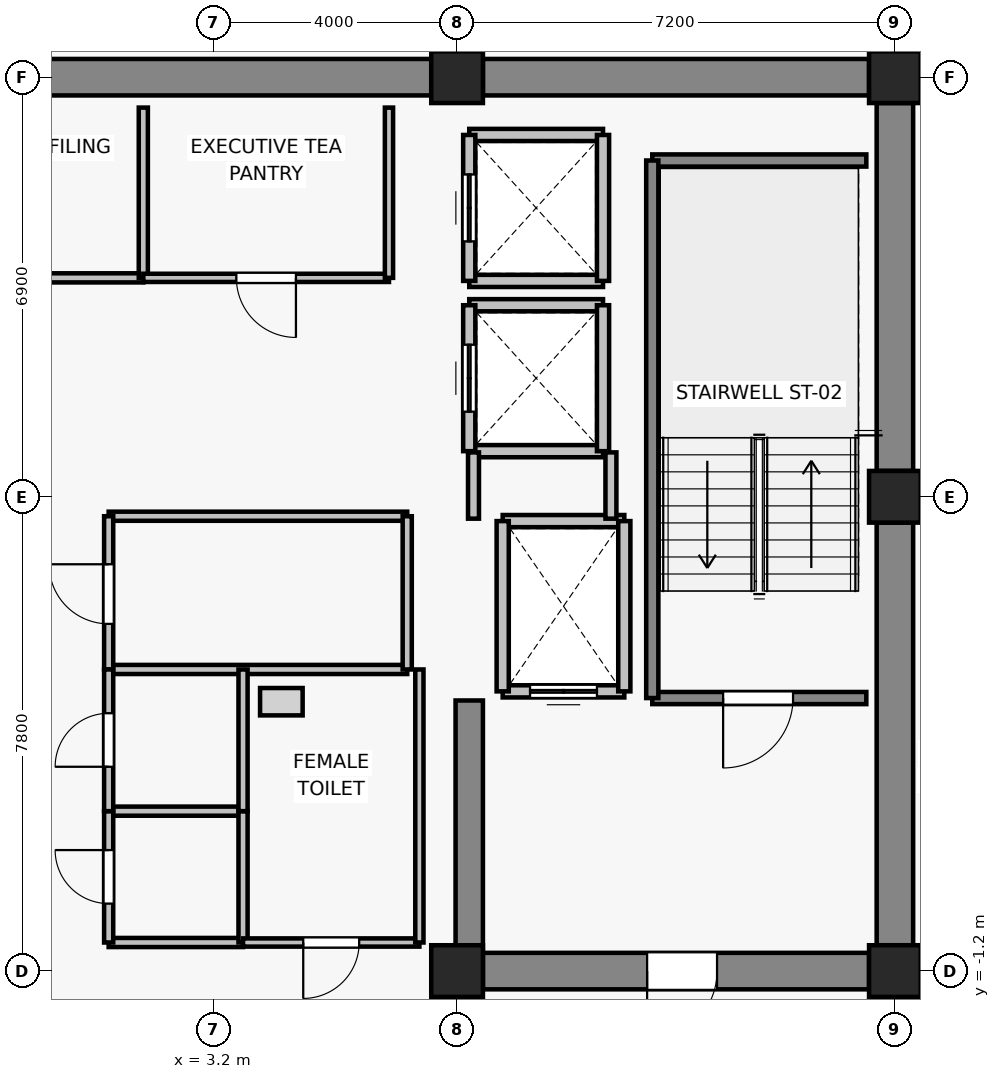
"""IFC4 building model, lengths in metres.
Left out: names, types, materials, properties, quantities, classifications, styles, units other than length and angle.
Written with IfcOpenShell. Run it as: python <this file> out.ifc"""

import sys

from ifc_helpers import new_model, si_unit, direction, frame, frame_2d, origin, origin_2d, place, context, subcontext, project, spatial, rectangle, extrude, source, transform, mapped, element, fill, save


model = new_model("IFC4")
c1 = context("Model", 3, precision=1e-05, world=origin(), true_north=direction((0.0, 1.0)))
c2 = subcontext(c1, "Body", "Model", "MODEL_VIEW")
j1 = project(units=[si_unit("LENGTHUNIT", "METRE"), si_unit("PLANEANGLEUNIT", "RADIAN")], contexts=[c1])
p1 = place(None, origin())
s1 = spatial("IfcSite", under=j1, at=p1, CompositionType="ELEMENT")
p2 = place(p1, origin())
s2 = spatial("IfcBuilding", under=s1, at=p2, CompositionType="ELEMENT")
p3 = place(p2, frame((0.0, 0.0, 222.1)))
s3 = spatial("IfcBuildingStorey", under=s2, at=p3, CompositionType="ELEMENT", Elevation=222.1)
for number, where, z_axis, x_axis in (
    (1, (7.2, -1.2, 0.0), (0.0, 0.0, 1.0), (1.0, 0.0, 0.0)),
    (2, (14.4, -1.2, 0.0), (0.0, 0.0, 1.0), (1.0, 0.0, 0.0)),
    (3, (14.4, 6.6, 0.0), (0.0, 0.0, 1.0), (1.0, 0.0, 0.0)),
    (4, (7.2, 13.5, 0.0), (0.0, 0.0, 1.0), (1.0, 0.0, 0.0)),
    (5, (14.4, 13.5, 0.0), (0.0, 0.0, 1.0), (1.0, 0.0, 0.0)),
):
    element("IfcColumn", number, at=place(p3, frame(where, z_axis=z_axis, x_axis=x_axis)), inside=s3, PredefinedType="COLUMN", context=c2, shape_type="SweptSolid", body=[
        extrude(rectangle(XDim=0.85, YDim=0.85, at=origin_2d()), origin(), (0.0, 0.0, 1.0), 3.3),
    ])
p4 = place(p3, frame((-6.775, 13.5, 0.0), z_axis=(0.0, 0.0, 1.0), x_axis=(1.0, 0.0, 0.0)))
e6 = element("IfcWall", 6, at=p4, inside=s3, PredefinedType="SHEAR", context=c2, shape_type="SweptSolid", body=[
    extrude(rectangle(XDim=13.55, YDim=0.6, at=frame_2d((6.775, 0.0))), origin(), (0.0, 0.0, 1.0), 3.075),
])
p5 = place(p3, frame((7.625, 13.5, 0.0), z_axis=(0.0, 0.0, 1.0), x_axis=(1.0, 0.0, 0.0)))
e7 = element("IfcWall", 7, at=p5, inside=s3, PredefinedType="SHEAR", context=c2, shape_type="SweptSolid", body=[
    extrude(rectangle(XDim=6.35, YDim=0.6, at=frame_2d((3.175, 0.0))), origin(), (0.0, 0.0, 1.0), 3.075),
])
p6 = place(p3, frame((14.4, -0.775, 0.0), z_axis=(0.0, 0.0, 1.0), x_axis=(0.0, 1.0, 0.0)))
e8 = element("IfcWall", 8, at=p6, inside=s3, PredefinedType="SHEAR", context=c2, shape_type="SweptSolid", body=[
    extrude(rectangle(XDim=6.95, YDim=0.6, at=frame_2d((3.475, 0.0))), origin(), (0.0, 0.0, 1.0), 3.075),
])
p7 = place(p3, frame((14.4, 7.025, 0.0), z_axis=(0.0, 0.0, 1.0), x_axis=(0.0, 1.0, 0.0)))
e9 = element("IfcWall", 9, at=p7, inside=s3, PredefinedType="SHEAR", context=c2, shape_type="SweptSolid", body=[
    extrude(rectangle(XDim=6.05, YDim=0.6, at=frame_2d((3.025, 0.0))), origin(), (0.0, 0.0, 1.0), 3.075),
])
p8 = place(p3, frame((13.975, -1.2, 0.0), z_axis=(0.0, 0.0, 1.0), x_axis=(-1.0, 0.0, 0.0)))
e10 = element("IfcWall", 10, at=p8, inside=s3, PredefinedType="SHEAR", context=c2, shape_type="SweptSolid", body=[
    extrude(rectangle(XDim=6.35, YDim=0.6, at=frame_2d((3.175, 0.0))), origin(), (0.0, 0.0, 1.0), 3.075),
])
p9 = place(p8, frame((2.5, 0.0, 0.0)))
e11 = element("IfcOpeningElement", 11, at=p9, cuts=e10, PredefinedType="OPENING", context=c2, shape_type="SweptSolid", body=[
    extrude(rectangle(XDim=1.15, YDim=2.15, at=frame_2d((0.575, 1.075))), frame((0.0, 0.31, 0.0), z_axis=(0.0, -1.0, 0.0), x_axis=(1.0, 0.0, 0.0)), (0.0, 0.0, 1.0), 0.62),
])
p10 = place(p3, frame((7.4, -0.9, 0.0), z_axis=(0.0, 0.0, 1.0), x_axis=(0.0, 1.0, 0.0)))
e12 = element("IfcWall", 12, at=p10, inside=s3, PredefinedType="SHEAR", context=c2, shape_type="SweptSolid", body=[
    extrude(rectangle(XDim=4.15, YDim=0.45, at=frame_2d((2.075, 0.0))), origin(), (0.0, 0.0, 1.0), 3.075),
])
p11 = place(p3, frame((9.95, 3.4, 0.0), z_axis=(0.0, 0.0, 1.0), x_axis=(-1.0, 0.0, 0.0)))
e13 = element("IfcWall", 13, at=p11, inside=s3, PredefinedType="SOLIDWALL", context=c2, shape_type="SweptSolid", body=[
    extrude(rectangle(XDim=2.0, YDim=0.2, at=frame_2d((1.0, 0.0))), origin(), (0.0, 0.0, 1.0), 3.075),
])
p12 = place(p11, frame((0.45, 0.0, 0.0)))
e14 = element("IfcOpeningElement", 14, at=p12, cuts=e13, PredefinedType="OPENING", context=c2, shape_type="SweptSolid", body=[
    extrude(rectangle(XDim=1.1, YDim=2.2, at=frame_2d((0.55, 1.1))), frame((0.0, 0.11, 0.0), z_axis=(0.0, -1.0, 0.0), x_axis=(1.0, 0.0, 0.0)), (0.0, 0.0, 1.0), 0.22),
])
p13 = place(p3, frame((7.95, 6.2, 0.0), z_axis=(0.0, 0.0, 1.0), x_axis=(1.0, 0.0, 0.0)))
e15 = element("IfcWall", 15, at=p13, inside=s3, PredefinedType="SOLIDWALL", context=c2, shape_type="SweptSolid", body=[
    extrude(rectangle(XDim=2.0, YDim=0.2, at=frame_2d((1.0, 0.0))), origin(), (0.0, 0.0, 1.0), 3.075),
])
for number, where, z_axis, x_axis in (
    (16, (7.95, 3.4, 0.0), (0.0, 0.0, 1.0), (0.0, 1.0, 0.0)),
    (17, (9.95, 6.2, 0.0), (0.0, 0.0, 1.0), (0.0, -1.0, 0.0)),
):
    element("IfcWall", number, at=place(p3, frame(where, z_axis=z_axis, x_axis=x_axis)), inside=s3, PredefinedType="SOLIDWALL", context=c2, shape_type="SweptSolid", body=[
        extrude(rectangle(XDim=2.8, YDim=0.2, at=frame_2d((1.4, 0.0))), origin(), (0.0, 0.0, 1.0), 3.075),
    ])
for number, where, z_axis, x_axis in (
    (18, (9.6, 7.35, 0.0), (0.0, 0.0, 1.0), (-1.0, 0.0, 0.0)),
    (19, (7.4, 9.75, 0.0), (0.0, 0.0, 1.0), (1.0, 0.0, 0.0)),
):
    element("IfcWall", number, at=place(p3, frame(where, z_axis=z_axis, x_axis=x_axis)), inside=s3, PredefinedType="SOLIDWALL", context=c2, shape_type="SweptSolid", body=[
        extrude(rectangle(XDim=2.2, YDim=0.2, at=frame_2d((1.1, 0.0))), origin(), (0.0, 0.0, 1.0), 2.615),
    ])
p14 = place(p3, frame((7.4, 7.35, 0.0), z_axis=(0.0, 0.0, 1.0), x_axis=(0.0, 1.0, 0.0)))
e20 = element("IfcWall", 20, at=p14, inside=s3, PredefinedType="SOLIDWALL", context=c2, shape_type="SweptSolid", body=[
    extrude(rectangle(XDim=2.4, YDim=0.2, at=frame_2d((1.2, 0.0))), origin(), (0.0, 0.0, 1.0), 2.615),
])
p15 = place(p14, frame((0.65, 0.0, 0.0)))
e21 = element("IfcOpeningElement", 21, at=p15, cuts=e20, PredefinedType="OPENING", context=c2, shape_type="SweptSolid", body=[
    extrude(rectangle(XDim=1.1, YDim=2.2, at=frame_2d((0.55, 1.1))), frame((0.0, 0.11, 0.0), z_axis=(0.0, -1.0, 0.0), x_axis=(1.0, 0.0, 0.0)), (0.0, 0.0, 1.0), 0.22),
])
p16 = place(p3, frame((9.6, 9.75, 0.0), z_axis=(0.0, 0.0, 1.0), x_axis=(0.0, -1.0, 0.0)))
e22 = element("IfcWall", 22, at=p16, inside=s3, PredefinedType="SOLIDWALL", context=c2, shape_type="SweptSolid", body=[
    extrude(rectangle(XDim=2.4, YDim=0.2, at=frame_2d((1.2, 0.0))), origin(), (0.0, 0.0, 1.0), 3.075),
])
for number, where, z_axis, x_axis in (
    (23, (9.6, 10.15, 0.0), (0.0, 0.0, 1.0), (-1.0, 0.0, 0.0)),
    (24, (7.4, 12.55, 0.0), (0.0, 0.0, 1.0), (1.0, 0.0, 0.0)),
):
    element("IfcWall", number, at=place(p3, frame(where, z_axis=z_axis, x_axis=x_axis)), inside=s3, PredefinedType="SOLIDWALL", context=c2, shape_type="SweptSolid", body=[
        extrude(rectangle(XDim=2.2, YDim=0.2, at=frame_2d((1.1, 0.0))), origin(), (0.0, 0.0, 1.0), 2.615),
    ])
p17 = place(p3, frame((7.4, 10.15, 0.0), z_axis=(0.0, 0.0, 1.0), x_axis=(0.0, 1.0, 0.0)))
e25 = element("IfcWall", 25, at=p17, inside=s3, PredefinedType="SOLIDWALL", context=c2, shape_type="SweptSolid", body=[
    extrude(rectangle(XDim=2.4, YDim=0.2, at=frame_2d((1.2, 0.0))), origin(), (0.0, 0.0, 1.0), 2.615),
])
p18 = place(p17, frame((0.65, 0.0, 0.0)))
e26 = element("IfcOpeningElement", 26, at=p18, cuts=e25, PredefinedType="OPENING", context=c2, shape_type="SweptSolid", body=[
    extrude(rectangle(XDim=1.1, YDim=2.2, at=frame_2d((0.55, 1.1))), frame((0.0, 0.11, 0.0), z_axis=(0.0, -1.0, 0.0), x_axis=(1.0, 0.0, 0.0)), (0.0, 0.0, 1.0), 0.22),
])
p19 = place(p3, frame((9.6, 12.55, 0.0), z_axis=(0.0, 0.0, 1.0), x_axis=(0.0, -1.0, 0.0)))
e27 = element("IfcWall", 27, at=p19, inside=s3, PredefinedType="SOLIDWALL", context=c2, shape_type="SweptSolid", body=[
    extrude(rectangle(XDim=2.4, YDim=0.2, at=frame_2d((1.2, 0.0))), origin(), (0.0, 0.0, 1.0), 3.075),
])
p20 = place(p3, frame((13.93, 3.29, 0.0), z_axis=(0.0, 0.0, 1.0), x_axis=(-1.0, 0.0, 0.0)))
e28 = element("IfcWall", 28, at=p20, inside=s3, PredefinedType="SOLIDWALL", context=c2, shape_type="SweptSolid", body=[
    extrude(rectangle(XDim=3.52, YDim=0.2, at=frame_2d((1.76, 0.0))), origin(), (0.0, 0.0, 1.0), 3.075),
])
p21 = place(p20, frame((1.205, 0.0, 0.0)))
e29 = element("IfcOpeningElement", 29, at=p21, cuts=e28, PredefinedType="OPENING", context=c2, shape_type="SweptSolid", body=[
    extrude(rectangle(XDim=1.15, YDim=2.15, at=frame_2d((0.575, 1.075))), frame((0.0, 0.11, 0.0), z_axis=(0.0, -1.0, 0.0), x_axis=(1.0, 0.0, 0.0)), (0.0, 0.0, 1.0), 0.22),
])
p22 = place(p3, frame((10.41, 12.13, 0.0), z_axis=(0.0, 0.0, 1.0), x_axis=(1.0, 0.0, 0.0)))
e30 = element("IfcWall", 30, at=p22, inside=s3, PredefinedType="SOLIDWALL", context=c2, shape_type="SweptSolid", body=[
    extrude(rectangle(XDim=3.52, YDim=0.2, at=frame_2d((1.76, 0.0))), origin(), (0.0, 0.0, 1.0), 3.075),
])
p23 = place(p3, frame((10.41, 3.29, 0.0), z_axis=(0.0, 0.0, 1.0), x_axis=(0.0, 1.0, 0.0)))
e31 = element("IfcWall", 31, at=p23, inside=s3, PredefinedType="SOLIDWALL", context=c2, shape_type="SweptSolid", body=[
    extrude(rectangle(XDim=8.84, YDim=0.2, at=frame_2d((4.42, 0.0))), origin(), (0.0, 0.0, 1.0), 3.075),
])
p24 = place(p3, frame((7.47, 6.24, 0.0), z_axis=(0.0, 0.0, 1.0), x_axis=(0.0, 1.0, 0.0)))
e32 = element("IfcWall", 32, at=p24, inside=s3, PredefinedType="PARTITIONING", context=c2, shape_type="SweptSolid", body=[
    extrude(rectangle(XDim=1.09, YDim=0.18, at=frame_2d((0.545, 0.0))), origin(), (0.0, 0.0, 1.0), 2.615),
])
p25 = place(p3, frame((9.73, 7.33, 0.0), z_axis=(0.0, 0.0, 1.0), x_axis=(0.0, -1.0, 0.0)))
e33 = element("IfcWall", 33, at=p25, inside=s3, PredefinedType="PARTITIONING", context=c2, shape_type="SweptSolid", body=[
    extrude(rectangle(XDim=1.09, YDim=0.18, at=frame_2d((0.545, 0.0))), origin(), (0.0, 0.0, 1.0), 3.075),
])
p26 = place(p3, frame((2.04, 10.2, 0.0), z_axis=(0.0, 0.0, 1.0), x_axis=(-1.0, 0.0, 0.0)))
e34 = element("IfcWall", 34, at=p26, inside=s3, PredefinedType="PARTITIONING", context=c2, shape_type="SweptSolid", body=[
    extrude(rectangle(XDim=4.16, YDim=0.15, at=frame_2d((2.08, 0.0))), origin(), (0.0, 0.0, 1.0), 3.075),
])
p27 = place(p26, frame((1.55, 0.0, 0.0)))
e35 = element("IfcOpeningElement", 35, at=p27, cuts=e34, PredefinedType="OPENING", context=c2, shape_type="SweptSolid", body=[
    extrude(rectangle(XDim=0.98, YDim=2.15, at=frame_2d((0.49, 1.075))), frame((0.0, 0.085, 0.0), z_axis=(0.0, -1.0, 0.0), x_axis=(1.0, 0.0, 0.0)), (0.0, 0.0, 1.0), 0.17),
])
p28 = place(p3, frame((2.04, 13.0, 0.0), z_axis=(0.0, 0.0, 1.0), x_axis=(0.0, -1.0, 0.0)))
e36 = element("IfcWall", 36, at=p28, inside=s3, PredefinedType="PARTITIONING", context=c2, shape_type="SweptSolid", body=[
    extrude(rectangle(XDim=2.8, YDim=0.15, at=frame_2d((1.4, 0.0))), origin(), (0.0, 0.0, 1.0), 3.075),
])
p29 = place(p3, frame((6.08, 10.2, 0.0), z_axis=(0.0, 0.0, 1.0), x_axis=(-1.0, 0.0, 0.0)))
e37 = element("IfcWall", 37, at=p29, inside=s3, PredefinedType="PARTITIONING", context=c2, shape_type="SweptSolid", body=[
    extrude(rectangle(XDim=4.04, YDim=0.135, at=frame_2d((2.02, 0.0))), origin(), (0.0, 0.0, 1.0), 3.075),
])
p30 = place(p29, frame((1.53, 0.0, 0.0)))
e38 = element("IfcOpeningElement", 38, at=p30, cuts=e37, PredefinedType="OPENING", context=c2, shape_type="SweptSolid", body=[
    extrude(rectangle(XDim=0.98, YDim=2.15, at=frame_2d((0.49, 1.075))), frame((0.0, 0.077, 0.0), z_axis=(0.0, -1.0, 0.0), x_axis=(1.0, 0.0, 0.0)), (0.0, 0.0, 1.0), 0.155),
])
p31 = place(p3, frame((6.08, 13.0, 0.0), z_axis=(0.0, 0.0, 1.0), x_axis=(0.0, -1.0, 0.0)))
e39 = element("IfcWall", 39, at=p31, inside=s3, PredefinedType="PARTITIONING", context=c2, shape_type="SweptSolid", body=[
    extrude(rectangle(XDim=2.8, YDim=0.135, at=frame_2d((1.4, 0.0))), origin(), (0.0, 0.0, 1.0), 3.075),
])
for number, where, z_axis, x_axis in (
    (40, (6.38, 3.76, 0.0), (0.0, 0.0, 1.0), (-1.0, 0.0, 0.0)),
    (41, (1.47, 6.28, 0.0), (0.0, 0.0, 1.0), (1.0, 0.0, 0.0)),
):
    element("IfcWall", number, at=place(p3, frame(where, z_axis=z_axis, x_axis=x_axis)), inside=s3, PredefinedType="PARTITIONING", context=c2, shape_type="SweptSolid", body=[
        extrude(rectangle(XDim=4.91, YDim=0.15, at=frame_2d((2.455, 0.0))), origin(), (0.0, 0.0, 1.0), 3.075),
    ])
p32 = place(p3, frame((1.47, 3.76, 0.0), z_axis=(0.0, 0.0, 1.0), x_axis=(0.0, 1.0, 0.0)))
e42 = element("IfcWall", 42, at=p32, inside=s3, PredefinedType="PARTITIONING", context=c2, shape_type="SweptSolid", body=[
    extrude(rectangle(XDim=2.52, YDim=0.15, at=frame_2d((1.26, 0.0))), origin(), (0.0, 0.0, 1.0), 3.075),
])
p33 = place(p32, frame((0.75, 0.0, 0.0)))
e43 = element("IfcOpeningElement", 43, at=p33, cuts=e42, PredefinedType="OPENING", context=c2, shape_type="SweptSolid", body=[
    extrude(rectangle(XDim=0.98, YDim=2.15, at=frame_2d((0.49, 1.075))), frame((0.0, 0.085, 0.0), z_axis=(0.0, -1.0, 0.0), x_axis=(1.0, 0.0, 0.0)), (0.0, 0.0, 1.0), 0.17),
])
p34 = place(p3, frame((6.38, 6.28, 0.0), z_axis=(0.0, 0.0, 1.0), x_axis=(0.0, -1.0, 0.0)))
e44 = element("IfcWall", 44, at=p34, inside=s3, PredefinedType="PARTITIONING", context=c2, shape_type="SweptSolid", body=[
    extrude(rectangle(XDim=2.52, YDim=0.15, at=frame_2d((1.26, 0.0))), origin(), (0.0, 0.0, 1.0), 3.075),
])
for number, where, z_axis, x_axis in (
    (45, (3.68, -0.73, 0.0), (0.0, 0.0, 1.0), (-1.0, 0.0, 0.0)),
    (46, (1.47, 1.43, 0.0), (0.0, 0.0, 1.0), (1.0, 0.0, 0.0)),
):
    element("IfcWall", number, at=place(p3, frame(where, z_axis=z_axis, x_axis=x_axis)), inside=s3, PredefinedType="PARTITIONING", context=c2, shape_type="SweptSolid", body=[
        extrude(rectangle(XDim=2.21, YDim=0.15, at=frame_2d((1.105, 0.0))), origin(), (0.0, 0.0, 1.0), 3.075),
    ])
p35 = place(p3, frame((1.47, -0.73, 0.0), z_axis=(0.0, 0.0, 1.0), x_axis=(0.0, 1.0, 0.0)))
e47 = element("IfcWall", 47, at=p35, inside=s3, PredefinedType="PARTITIONING", context=c2, shape_type="SweptSolid", body=[
    extrude(rectangle(XDim=2.16, YDim=0.15, at=frame_2d((1.08, 0.0))), origin(), (0.0, 0.0, 1.0), 3.075),
])
p36 = place(p35, frame((0.64, 0.0, 0.0)))
e48 = element("IfcOpeningElement", 48, at=p36, cuts=e47, PredefinedType="OPENING", context=c2, shape_type="SweptSolid", body=[
    extrude(rectangle(XDim=0.88, YDim=2.1, at=frame_2d((0.44, 1.05))), frame((0.0, 0.085, 0.0), z_axis=(0.0, -1.0, 0.0), x_axis=(1.0, 0.0, 0.0)), (0.0, 0.0, 1.0), 0.17),
])
p37 = place(p3, frame((3.68, 1.43, 0.0), z_axis=(0.0, 0.0, 1.0), x_axis=(0.0, -1.0, 0.0)))
e49 = element("IfcWall", 49, at=p37, inside=s3, PredefinedType="PARTITIONING", context=c2, shape_type="SweptSolid", body=[
    extrude(rectangle(XDim=2.16, YDim=0.15, at=frame_2d((1.08, 0.0))), origin(), (0.0, 0.0, 1.0), 3.075),
])
p38 = place(p3, frame((1.47, 1.43, 0.0), z_axis=(0.0, 0.0, 1.0), x_axis=(0.0, 1.0, 0.0)))
e50 = element("IfcWall", 50, at=p38, inside=s3, PredefinedType="PARTITIONING", context=c2, shape_type="SweptSolid", body=[
    extrude(rectangle(XDim=2.33, YDim=0.15, at=frame_2d((1.165, 0.0))), origin(), (0.0, 0.0, 1.0), 3.075),
])
p39 = place(p38, frame((0.73, 0.0, 0.0)))
e51 = element("IfcOpeningElement", 51, at=p39, cuts=e50, PredefinedType="OPENING", context=c2, shape_type="SweptSolid", body=[
    extrude(rectangle(XDim=0.88, YDim=2.15, at=frame_2d((0.44, 1.075))), frame((0.0, 0.085, 0.0), z_axis=(0.0, -1.0, 0.0), x_axis=(1.0, 0.0, 0.0)), (0.0, 0.0, 1.0), 0.17),
])
p40 = place(p3, frame((3.68, 3.76, 0.0), z_axis=(0.0, 0.0, 1.0), x_axis=(0.0, -1.0, 0.0)))
e52 = element("IfcWall", 52, at=p40, inside=s3, PredefinedType="PARTITIONING", context=c2, shape_type="SweptSolid", body=[
    extrude(rectangle(XDim=2.33, YDim=0.15, at=frame_2d((1.165, 0.0))), origin(), (0.0, 0.0, 1.0), 3.075),
])
p41 = place(p3, frame((6.58, -0.73, 0.0), z_axis=(0.0, 0.0, 1.0), x_axis=(-1.0, 0.0, 0.0)))
e53 = element("IfcWall", 53, at=p41, inside=s3, PredefinedType="PARTITIONING", context=c2, shape_type="SweptSolid", body=[
    extrude(rectangle(XDim=2.9, YDim=0.135, at=frame_2d((1.45, 0.0))), origin(), (0.0, 0.0, 1.0), 3.075),
])
p42 = place(p41, frame((0.99, 0.0, 0.0)))
e54 = element("IfcOpeningElement", 54, at=p42, cuts=e53, PredefinedType="OPENING", context=c2, shape_type="SweptSolid", body=[
    extrude(rectangle(XDim=0.92, YDim=2.1, at=frame_2d((0.46, 1.05))), frame((0.0, 0.077, 0.0), z_axis=(0.0, -1.0, 0.0), x_axis=(1.0, 0.0, 0.0)), (0.0, 0.0, 1.0), 0.155),
])
p43 = place(p3, frame((6.58, 3.76, 0.0), z_axis=(0.0, 0.0, 1.0), x_axis=(0.0, -1.0, 0.0)))
e55 = element("IfcWall", 55, at=p43, inside=s3, PredefinedType="PARTITIONING", context=c2, shape_type="SweptSolid", body=[
    extrude(rectangle(XDim=4.49, YDim=0.135, at=frame_2d((2.245, 0.0))), origin(), (0.0, 0.0, 1.0), 3.075),
])
m1 = source(origin(), c2, "Body", "SweptSolid", [
    extrude(rectangle(XDim=1.1, YDim=2.2, at=frame_2d((0.55, 1.1))), frame((0.0, 0.025, 0.0), z_axis=(0.0, -1.0, 0.0), x_axis=(1.0, 0.0, 0.0)), (0.0, 0.0, 1.0), 0.05),
])
p44 = place(p12, origin())
e56 = element("IfcDoor", 56, at=p44, inside=s3, OperationType="DOUBLE_DOOR_SLIDING", PredefinedType="DOOR", context=c2, shape_type="MappedRepresentation", body=[
    mapped(m1, transform((0.0, 0.0, 0.0), x_axis=(1.0, 0.0, 0.0), y_axis=(0.0, 1.0, 0.0), z_axis=(0.0, 0.0, 1.0), scale=1.0)),
])
fill(e14, e56)
p45 = place(p15, origin())
e57 = element("IfcDoor", 57, at=p45, inside=s3, OperationType="DOUBLE_DOOR_SLIDING", PredefinedType="DOOR", context=c2, shape_type="MappedRepresentation", body=[
    mapped(m1, transform((0.0, 0.0, 0.0), x_axis=(1.0, 0.0, 0.0), y_axis=(0.0, 1.0, 0.0), z_axis=(0.0, 0.0, 1.0), scale=1.0)),
])
fill(e21, e57)
p46 = place(p18, origin())
e58 = element("IfcDoor", 58, at=p46, inside=s3, OperationType="DOUBLE_DOOR_SLIDING", PredefinedType="DOOR", context=c2, shape_type="MappedRepresentation", body=[
    mapped(m1, transform((0.0, 0.0, 0.0), x_axis=(1.0, 0.0, 0.0), y_axis=(0.0, 1.0, 0.0), z_axis=(0.0, 0.0, 1.0), scale=1.0)),
])
fill(e26, e58)
m2 = source(origin(), c2, "Body", "SweptSolid", [
    extrude(rectangle(XDim=1.15, YDim=2.15, at=frame_2d((0.575, 1.075))), frame((0.0, 0.025, 0.0), z_axis=(0.0, -1.0, 0.0), x_axis=(1.0, 0.0, 0.0)), (0.0, 0.0, 1.0), 0.05),
])
p47 = place(p21, origin())
e59 = element("IfcDoor", 59, at=p47, inside=s3, OperationType="SINGLE_SWING_RIGHT", PredefinedType="DOOR", context=c2, shape_type="MappedRepresentation", body=[
    mapped(m2, transform((0.0, 0.0, 0.0), x_axis=(1.0, 0.0, 0.0), y_axis=(0.0, 1.0, 0.0), z_axis=(0.0, 0.0, 1.0), scale=1.0)),
])
fill(e29, e59)
p48 = place(p9, origin())
e60 = element("IfcDoor", 60, at=p48, inside=s3, OperationType="SINGLE_SWING_RIGHT", PredefinedType="DOOR", context=c2, shape_type="MappedRepresentation", body=[
    mapped(m2, transform((0.0, 0.0, 0.0), x_axis=(1.0, 0.0, 0.0), y_axis=(0.0, 1.0, 0.0), z_axis=(0.0, 0.0, 1.0), scale=1.0)),
])
fill(e11, e60)
m3 = source(origin(), c2, "Body", "SweptSolid", [
    extrude(rectangle(XDim=0.98, YDim=2.15, at=frame_2d((0.49, 1.075))), frame((0.0, 0.025, 0.0), z_axis=(0.0, -1.0, 0.0), x_axis=(1.0, 0.0, 0.0)), (0.0, 0.0, 1.0), 0.05),
])
p49 = place(p30, origin())
e61 = element("IfcDoor", 61, at=p49, inside=s3, OperationType="SINGLE_SWING_LEFT", PredefinedType="DOOR", context=c2, shape_type="MappedRepresentation", body=[
    mapped(m3, transform((0.0, 0.0, 0.0), x_axis=(1.0, 0.0, 0.0), y_axis=(0.0, 1.0, 0.0), z_axis=(0.0, 0.0, 1.0), scale=1.0)),
])
fill(e38, e61)
p50 = place(p33, origin())
e62 = element("IfcDoor", 62, at=p50, inside=s3, OperationType="SINGLE_SWING_RIGHT", PredefinedType="DOOR", context=c2, shape_type="MappedRepresentation", body=[
    mapped(m3, transform((0.0, 0.0, 0.0), x_axis=(1.0, 0.0, 0.0), y_axis=(0.0, 1.0, 0.0), z_axis=(0.0, 0.0, 1.0), scale=1.0)),
])
fill(e43, e62)
m4 = source(origin(), c2, "Body", "SweptSolid", [
    extrude(rectangle(XDim=0.88, YDim=2.1, at=frame_2d((0.44, 1.05))), frame((0.0, 0.025, 0.0), z_axis=(0.0, -1.0, 0.0), x_axis=(1.0, 0.0, 0.0)), (0.0, 0.0, 1.0), 0.05),
])
p51 = place(p36, origin())
e63 = element("IfcDoor", 63, at=p51, inside=s3, OperationType="SINGLE_SWING_RIGHT", PredefinedType="DOOR", context=c2, shape_type="MappedRepresentation", body=[
    mapped(m4, transform((0.0, 0.0, 0.0), x_axis=(1.0, 0.0, 0.0), y_axis=(0.0, 1.0, 0.0), z_axis=(0.0, 0.0, 1.0), scale=1.0)),
])
fill(e48, e63)
m5 = source(origin(), c2, "Body", "SweptSolid", [
    extrude(rectangle(XDim=0.88, YDim=2.15, at=frame_2d((0.44, 1.075))), frame((0.0, 0.025, 0.0), z_axis=(0.0, -1.0, 0.0), x_axis=(1.0, 0.0, 0.0)), (0.0, 0.0, 1.0), 0.05),
])
p52 = place(p39, origin())
e64 = element("IfcDoor", 64, at=p52, inside=s3, OperationType="SINGLE_SWING_LEFT", PredefinedType="DOOR", context=c2, shape_type="MappedRepresentation", body=[
    mapped(m5, transform((0.0, 0.0, 0.0), x_axis=(1.0, 0.0, 0.0), y_axis=(0.0, 1.0, 0.0), z_axis=(0.0, 0.0, 1.0), scale=1.0)),
])
fill(e51, e64)
m6 = source(origin(), c2, "Body", "SweptSolid", [
    extrude(rectangle(XDim=0.92, YDim=2.1, at=frame_2d((0.46, 1.05))), frame((0.0, 0.025, 0.0), z_axis=(0.0, -1.0, 0.0), x_axis=(1.0, 0.0, 0.0)), (0.0, 0.0, 1.0), 0.05),
])
p53 = place(p42, origin())
e65 = element("IfcDoor", 65, at=p53, inside=s3, OperationType="SINGLE_SWING_RIGHT", PredefinedType="DOOR", context=c2, shape_type="MappedRepresentation", body=[
    mapped(m6, transform((0.0, 0.0, 0.0), x_axis=(1.0, 0.0, 0.0), y_axis=(0.0, 1.0, 0.0), z_axis=(0.0, 0.0, 1.0), scale=1.0)),
])
fill(e54, e65)
save(model, sys.argv[1])
